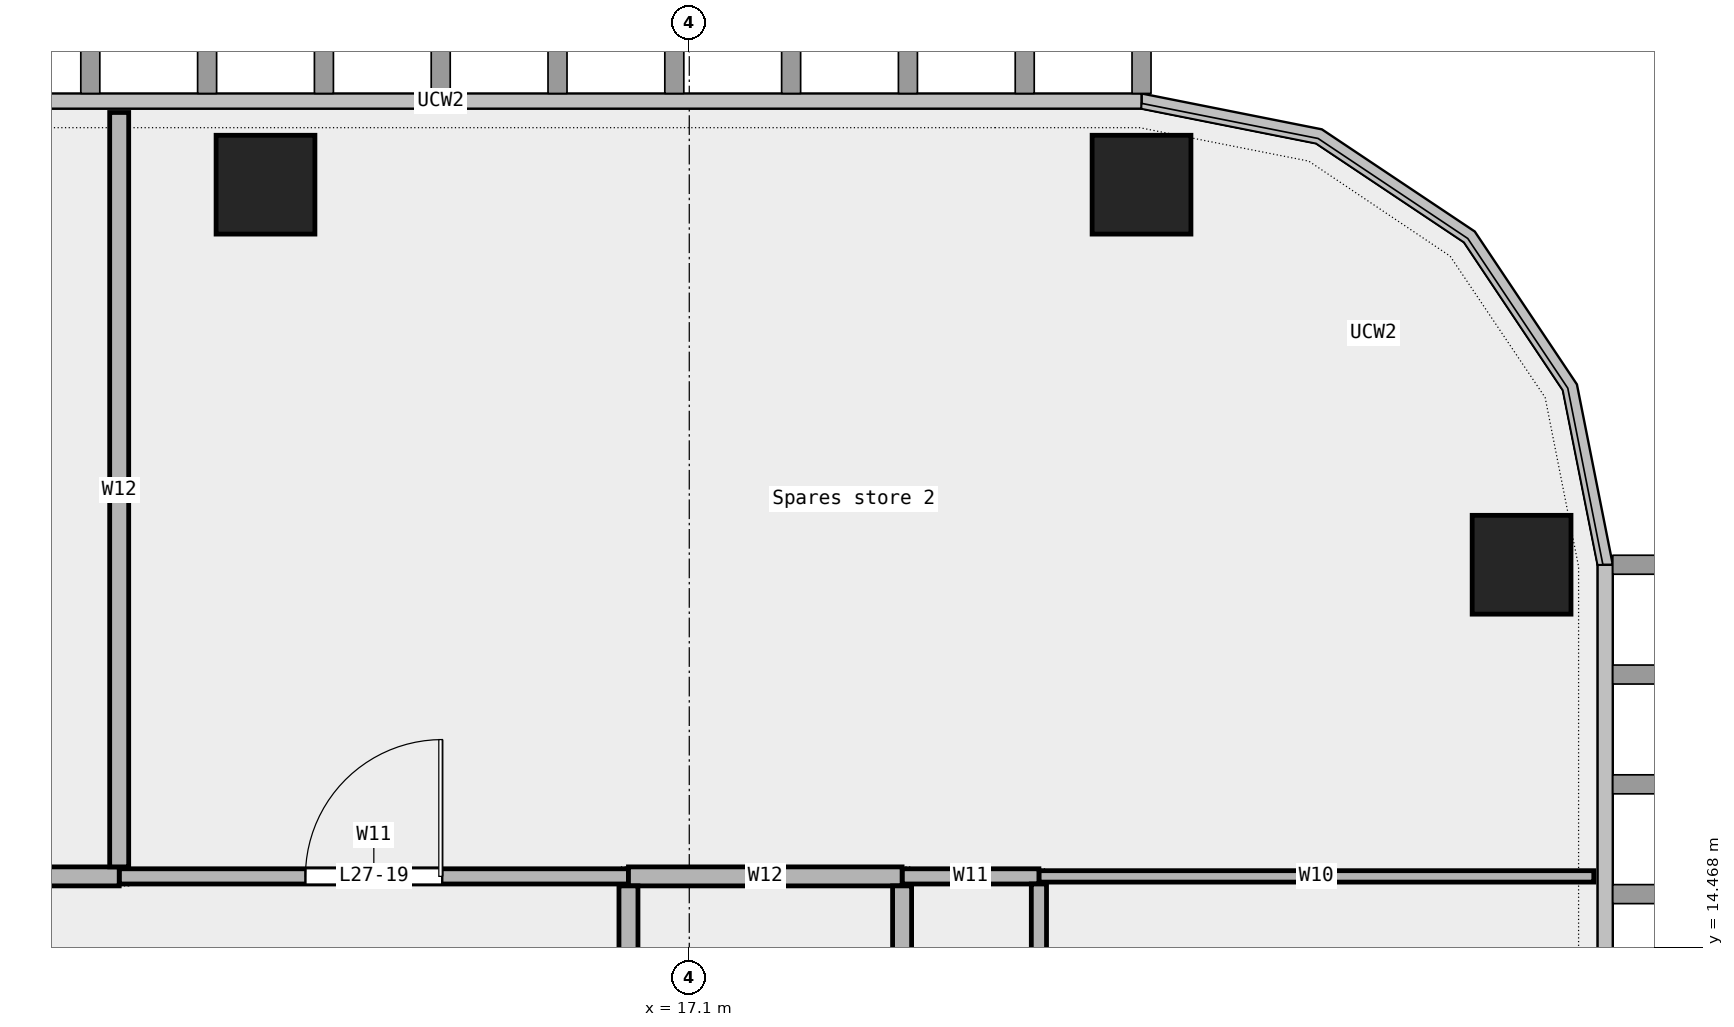
"""IFC4 building model, lengths in metres.
Left out: names, types, materials, properties, quantities, classifications, styles, units other than length and angle.
Written with IfcOpenShell. Run it as: python <this file> out.ifc"""

import sys

from ifc_helpers import new_model, si_unit, direction, frame, frame_2d, origin, origin_2d, place, context, subcontext, project, spatial, rectangle, extrude, element, fill, save


model = new_model("IFC4")
c1 = context("Model", 3, precision=1e-05, world=origin(), true_north=direction((0.0, 1.0)))
c2 = subcontext(c1, "Body", "Model", "MODEL_VIEW")
j1 = project(units=[si_unit("LENGTHUNIT", "METRE"), si_unit("PLANEANGLEUNIT", "RADIAN")], contexts=[c1])
p1 = place(None, origin())
s1 = spatial("IfcSite", under=j1, at=p1, CompositionType="ELEMENT")
p2 = place(p1, origin())
s2 = spatial("IfcBuilding", under=s1, at=p2, CompositionType="ELEMENT")
p3 = place(p2, frame((0.0, 0.0, 135.1)))
s3 = spatial("IfcBuildingStorey", under=s2, at=p3, CompositionType="ELEMENT", Elevation=135.1)
for number, where, z_axis, x_axis in (
    (1, (28.05, 19.5, 0.0), (0.0, 0.0, 1.0), (1.0, 0.0, 0.0)),
    (2, (23.05, 24.5, 0.0), (0.0, 0.0, 1.0), (1.0, 0.0, 0.0)),
    (3, (11.525, 24.5, 0.0), (0.0, 0.0, 1.0), (1.0, 0.0, 0.0)),
):
    element("IfcColumn", number, at=place(p3, frame(where, z_axis=z_axis, x_axis=x_axis)), inside=s3, PredefinedType="COLUMN", context=c2, shape_type="SweptSolid", body=[
        extrude(rectangle(XDim=1.3, YDim=1.3, at=origin_2d()), origin(), (0.0, 0.0, 1.0), 4.05),
    ])
p4 = place(p3, frame((21.7, 15.4, 0.0), z_axis=(0.0, 0.0, 1.0), x_axis=(1.0, 0.0, 0.0)))
e4 = element("IfcWall", 4, at=p4, inside=s3, PredefinedType="PARTITIONING", context=c2, shape_type="SweptSolid", body=[
    extrude(rectangle(XDim=7.3, YDim=0.15, at=frame_2d((3.65, 0.0))), origin(), (0.0, 0.0, 1.0), 4.05),
])
p5 = place(p3, frame((9.6, 15.4, 0.0), z_axis=(0.0, 0.0, 1.0), x_axis=(1.0, 0.0, 0.0)))
e5 = element("IfcWall", 5, at=p5, inside=s3, PredefinedType="PARTITIONING", context=c2, shape_type="SweptSolid", body=[
    extrude(rectangle(XDim=6.7, YDim=0.2, at=frame_2d((3.35, 0.0))), origin(), (0.0, 0.0, 1.0), 4.05),
])
p6 = place(p5, frame((2.45, 0.0, 0.0)))
e6 = element("IfcOpeningElement", 6, at=p6, cuts=e5, PredefinedType="OPENING", context=c2, shape_type="SweptSolid", body=[
    extrude(rectangle(XDim=1.8, YDim=2.1, at=frame_2d((0.9, 1.05))), frame((0.0, 0.112, 0.0), z_axis=(0.0, -1.0, 0.0), x_axis=(1.0, 0.0, 0.0)), (0.0, 0.0, 1.0), 0.224),
])
p7 = place(p3, frame((19.9, 15.4, 0.0), z_axis=(0.0, 0.0, 1.0), x_axis=(1.0, 0.0, 0.0)))
e7 = element("IfcWall", 7, at=p7, inside=s3, PredefinedType="PARTITIONING", context=c2, shape_type="SweptSolid", body=[
    extrude(rectangle(XDim=1.8, YDim=0.2, at=frame_2d((0.9, 0.0))), origin(), (0.0, 0.0, 1.0), 4.05),
])
p8 = place(p3, frame((4.61, 15.4, 0.0), z_axis=(0.0, 0.0, 1.0), x_axis=(1.0, 0.0, 0.0)))
e8 = element("IfcWall", 8, at=p8, inside=s3, PredefinedType="PARTITIONING", context=c2, shape_type="SweptSolid", body=[
    extrude(rectangle(XDim=4.99, YDim=0.25, at=frame_2d((2.495, 0.0))), origin(), (0.0, 0.0, 1.0), 4.05),
])
p9 = place(p8, frame((1.895, 0.0, 0.0)))
e9 = element("IfcOpeningElement", 9, at=p9, cuts=e8, PredefinedType="OPENING", context=c2, shape_type="SweptSolid", body=[
    extrude(rectangle(XDim=1.2, YDim=2.1, at=frame_2d((0.6, 1.05))), frame((0.0, 0.137, 0.0), z_axis=(0.0, -1.0, 0.0), x_axis=(1.0, 0.0, 0.0)), (0.0, 0.0, 1.0), 0.274),
])
p10 = place(p3, frame((16.3, 15.4, 0.0), z_axis=(0.0, 0.0, 1.0), x_axis=(1.0, 0.0, 0.0)))
e10 = element("IfcWall", 10, at=p10, inside=s3, PredefinedType="PARTITIONING", context=c2, shape_type="SweptSolid", body=[
    extrude(rectangle(XDim=3.6, YDim=0.25, at=frame_2d((1.8, 0.0))), origin(), (0.0, 0.0, 1.0), 4.05),
])
p11 = place(p3, frame((9.6, 15.525, 0.0), z_axis=(0.0, 0.0, 1.0), x_axis=(0.0, 1.0, 0.0)))
e11 = element("IfcWall", 11, at=p11, inside=s3, PredefinedType="PARTITIONING", context=c2, shape_type="SweptSolid", body=[
    extrude(rectangle(XDim=9.925, YDim=0.25, at=frame_2d((4.962, 0.0))), origin(), (0.0, 0.0, 1.0), 4.05),
])
p12 = place(p3, frame((16.3, 11.75, 0.0), z_axis=(0.0, 0.0, 1.0), x_axis=(0.0, 1.0, 0.0)))
e12 = element("IfcWall", 12, at=p12, inside=s3, PredefinedType="PARTITIONING", context=c2, shape_type="SweptSolid", body=[
    extrude(rectangle(XDim=3.525, YDim=0.25, at=frame_2d((1.762, 0.0))), origin(), (0.0, 0.0, 1.0), 4.05),
])
p13 = place(p3, frame((19.9, 2.975, 0.0), z_axis=(0.0, 0.0, 1.0), x_axis=(0.0, 1.0, 0.0)))
e13 = element("IfcWall", 13, at=p13, inside=s3, PredefinedType="PARTITIONING", context=c2, shape_type="SweptSolid", body=[
    extrude(rectangle(XDim=12.3, YDim=0.25, at=frame_2d((6.15, 0.0))), origin(), (0.0, 0.0, 1.0), 4.05),
])
p14 = place(p13, frame((8.775, 0.0, 0.0)))
e14 = element("IfcOpeningElement", 14, at=p14, cuts=e13, PredefinedType="OPENING", context=c2, shape_type="SweptSolid", body=[
    extrude(rectangle(XDim=0.9, YDim=2.1, at=frame_2d((0.45, 1.05))), frame((0.0, 0.137, 0.0), z_axis=(0.0, -1.0, 0.0), x_axis=(1.0, 0.0, 0.0)), (0.0, 0.0, 1.0), 0.274),
])
p15 = place(p13, frame((2.625, 0.0, 0.0)))
e15 = element("IfcOpeningElement", 15, at=p15, cuts=e13, PredefinedType="OPENING", context=c2, shape_type="SweptSolid", body=[
    extrude(rectangle(XDim=0.9, YDim=2.1, at=frame_2d((0.45, 1.05))), frame((0.0, 0.137, 0.0), z_axis=(0.0, -1.0, 0.0), x_axis=(1.0, 0.0, 0.0)), (0.0, 0.0, 1.0), 0.274),
])
p16 = place(p3, frame((21.7, -9.0, 0.0), z_axis=(0.0, 0.0, 1.0), x_axis=(0.0, 1.0, 0.0)))
e16 = element("IfcWall", 16, at=p16, inside=s3, PredefinedType="PARTITIONING", context=c2, shape_type="SweptSolid", body=[
    extrude(rectangle(XDim=24.3, YDim=0.2, at=frame_2d((12.15, 0.0))), origin(), (0.0, 0.0, 1.0), 4.05),
])
p17 = place(p16, frame((18.645, 0.0, 0.0)))
e17 = element("IfcOpeningElement", 17, at=p17, cuts=e16, PredefinedType="OPENING", context=c2, shape_type="SweptSolid", body=[
    extrude(rectangle(XDim=1.2, YDim=2.1, at=frame_2d((0.6, 1.05))), frame((0.0, 0.112, 0.0), z_axis=(0.0, -1.0, 0.0), x_axis=(1.0, 0.0, 0.0)), (0.0, 0.0, 1.0), 0.224),
])
p18 = place(p16, frame((4.833, 0.0, 0.0)))
e18 = element("IfcOpeningElement", 18, at=p18, cuts=e16, PredefinedType="OPENING", context=c2, shape_type="SweptSolid", body=[
    extrude(rectangle(XDim=1.5, YDim=2.1, at=frame_2d((0.75, 1.05))), frame((0.0, 0.112, 0.0), z_axis=(0.0, -1.0, 0.0), x_axis=(1.0, 0.0, 0.0)), (0.0, 0.0, 1.0), 0.224),
])
p19 = place(p16, frame((12.228, 0.0, 0.0)))
e19 = element("IfcOpeningElement", 19, at=p19, cuts=e16, PredefinedType="OPENING", context=c2, shape_type="SweptSolid", body=[
    extrude(rectangle(XDim=0.9, YDim=2.1, at=frame_2d((0.45, 1.05))), frame((0.0, 0.112, 0.0), z_axis=(0.0, -1.0, 0.0), x_axis=(1.0, 0.0, 0.0)), (0.0, 0.0, 1.0), 0.224),
])
p20 = place(p6, origin())
e20 = element("IfcDoor", 20, at=p20, inside=s3, OperationType="DOUBLE_DOOR_SINGLE_SWING", PredefinedType="DOOR", context=c2, shape_type="SweptSolid", body=[
    extrude(rectangle(XDim=1.8, YDim=2.1, at=frame_2d((0.9, 1.05))), frame((0.0, 0.025, 0.0), z_axis=(0.0, -1.0, 0.0), x_axis=(1.0, 0.0, 0.0)), (0.0, 0.0, 1.0), 0.05),
])
fill(e6, e20)
save(model, sys.argv[1])
